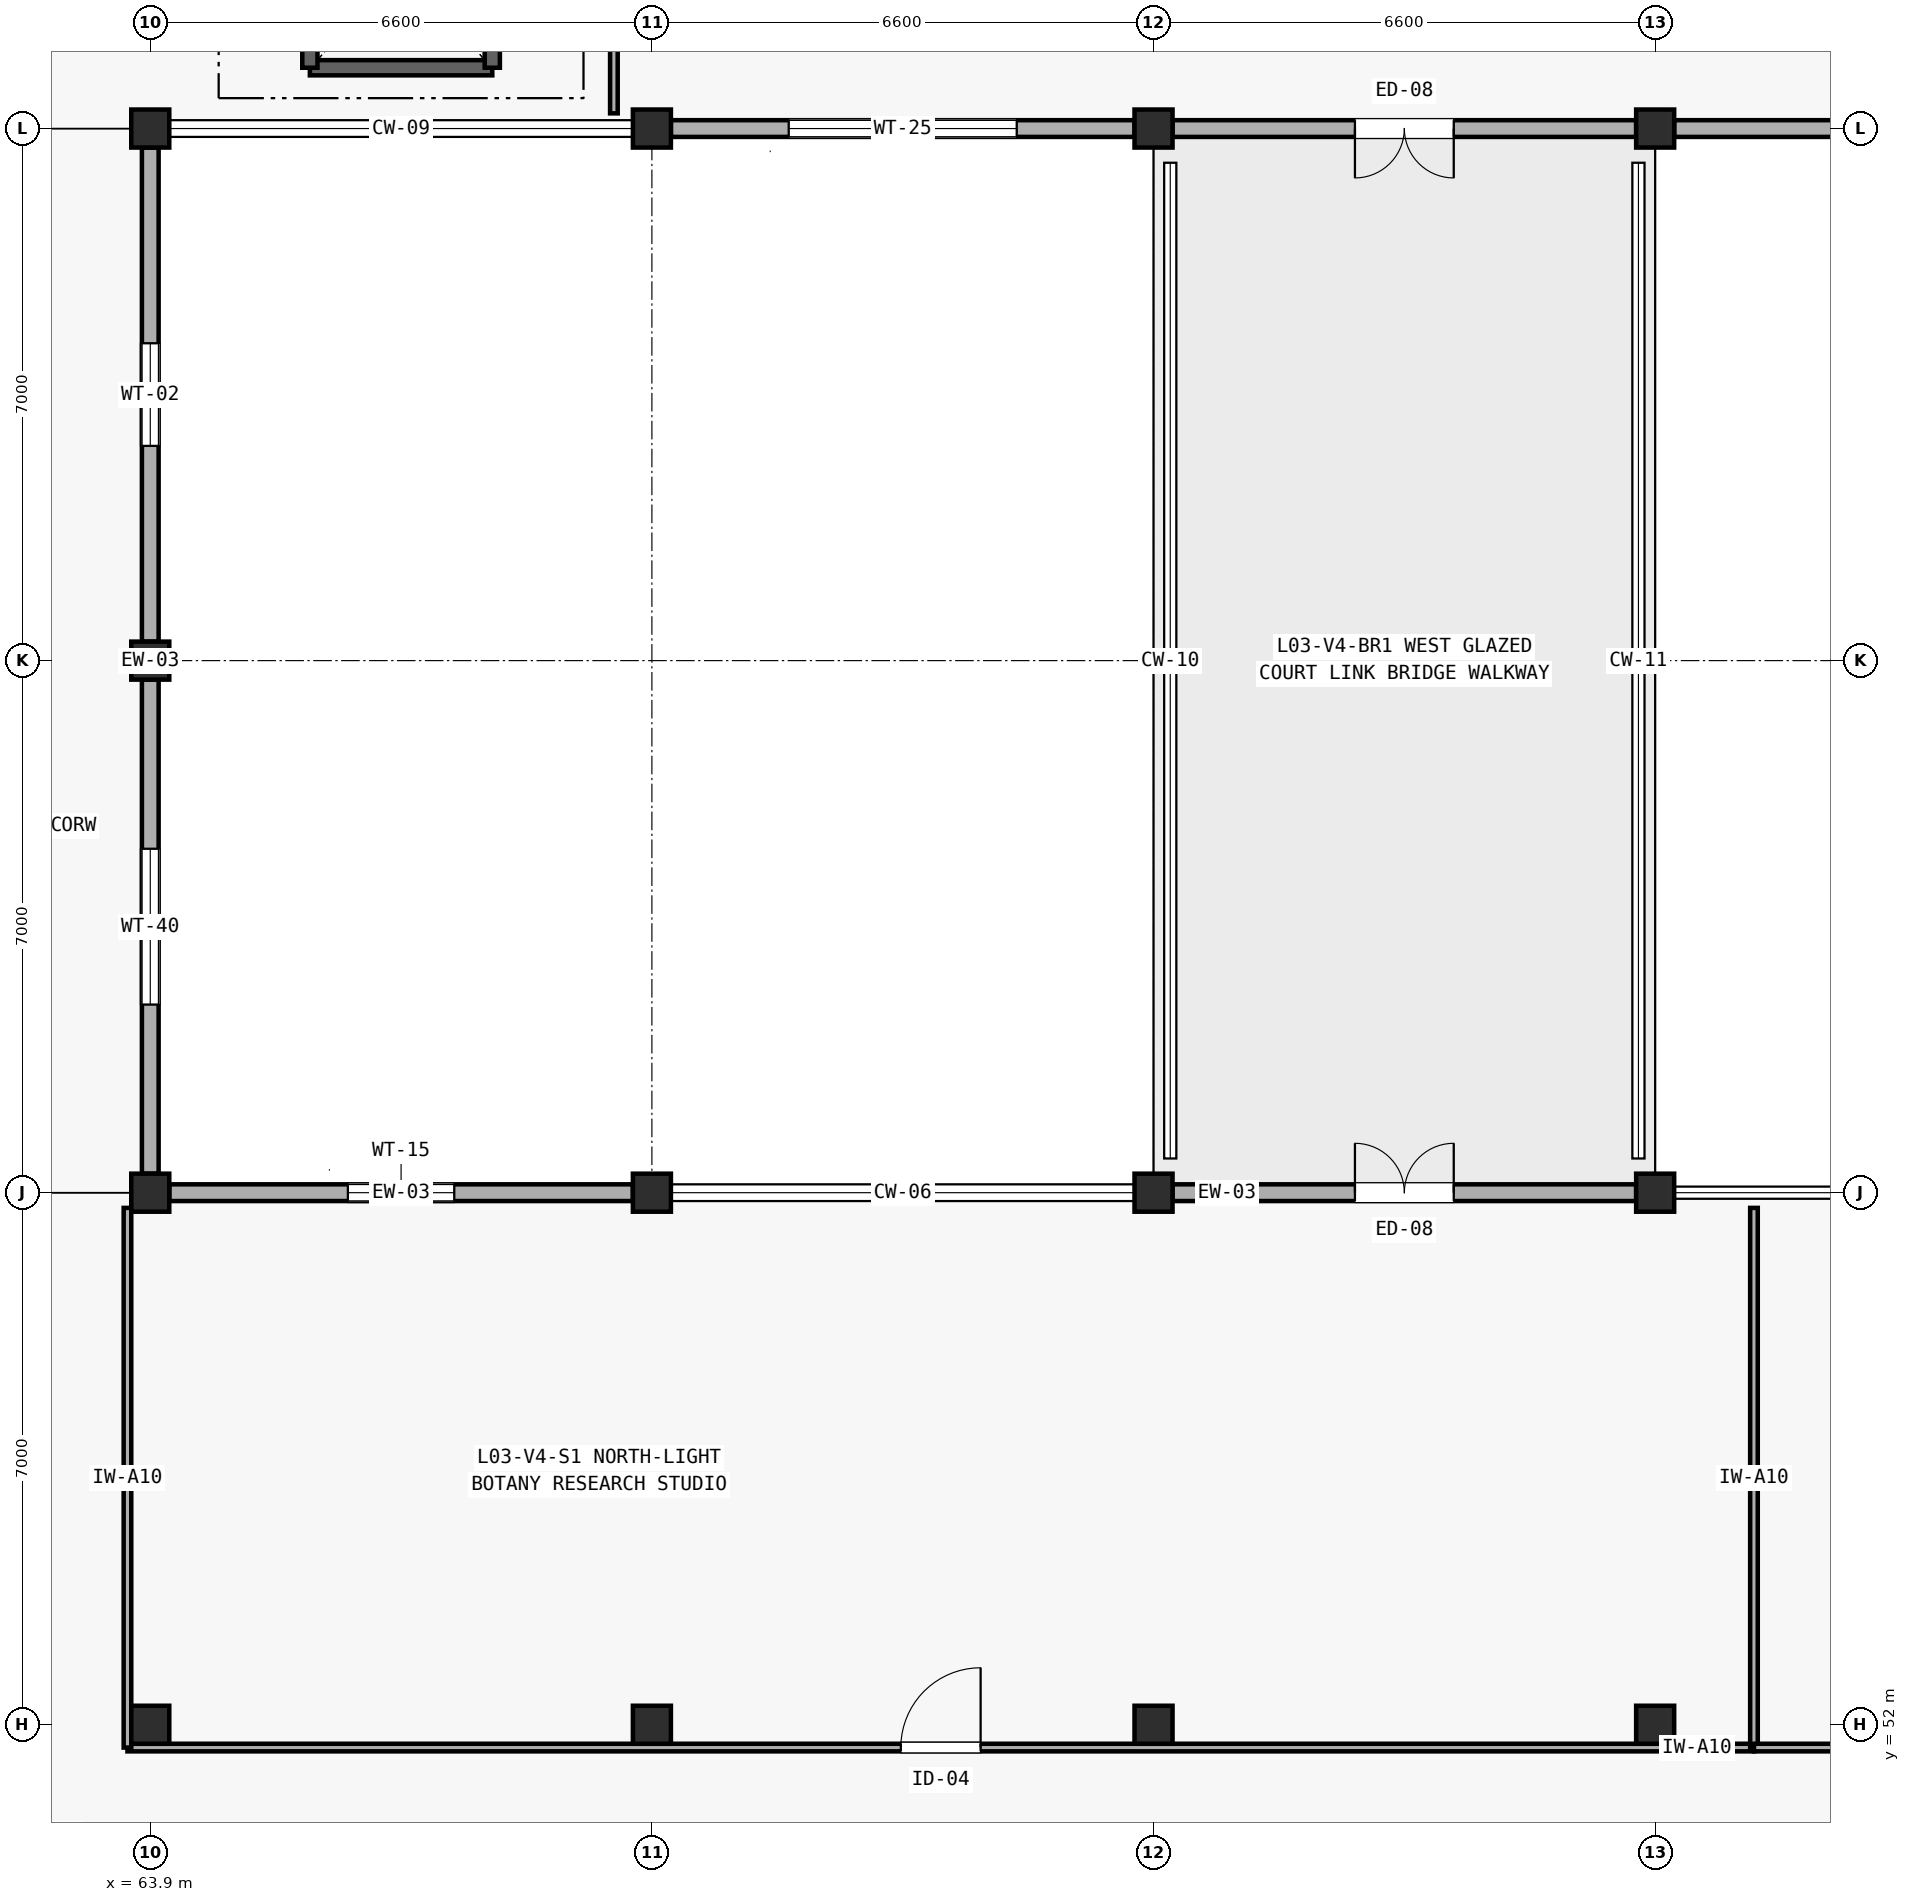
"""IFC4 building model, lengths in metres.
Left out: names, types, materials, properties, quantities, classifications, styles, units other than length and angle.
Written with IfcOpenShell. Run it as: python <this file> out.ifc"""

import sys

from ifc_helpers import new_model, si_unit, direction, frame, frame_2d, origin, origin_2d, place, context, subcontext, project, spatial, rectangle, extrude, element, fill, save


model = new_model("IFC4")
c1 = context("Model", 3, precision=1e-05, world=origin(), true_north=direction((0.0, 1.0)))
c2 = subcontext(c1, "Body", "Model", "MODEL_VIEW")
j1 = project(units=[si_unit("LENGTHUNIT", "METRE"), si_unit("PLANEANGLEUNIT", "RADIAN")], contexts=[c1])
p1 = place(None, origin())
s1 = spatial("IfcSite", under=j1, at=p1, CompositionType="ELEMENT")
p2 = place(p1, origin())
s2 = spatial("IfcBuilding", under=s1, at=p2, CompositionType="ELEMENT")
p3 = place(p2, frame((0.0, 0.0, 12.6)))
s3 = spatial("IfcBuildingStorey", under=s2, at=p3, CompositionType="ELEMENT", Elevation=12.6)
for number, where, z_axis, x_axis in (
    (1, (63.9, 52.0, 0.0), (0.0, 0.0, 1.0), (1.0, 0.0, 0.0)),
    (2, (63.9, 59.0, 0.0), (0.0, 0.0, 1.0), (1.0, 0.0, 0.0)),
    (3, (63.9, 66.0, 0.0), (0.0, 0.0, 1.0), (1.0, 0.0, 0.0)),
    (4, (63.9, 73.0, 0.0), (0.0, 0.0, 1.0), (1.0, 0.0, 0.0)),
    (5, (70.5, 52.0, 0.0), (0.0, 0.0, 1.0), (1.0, 0.0, 0.0)),
    (6, (70.5, 59.0, 0.0), (0.0, 0.0, 1.0), (1.0, 0.0, 0.0)),
    (7, (70.5, 73.0, 0.0), (0.0, 0.0, 1.0), (1.0, 0.0, 0.0)),
    (8, (77.1, 52.0, 0.0), (0.0, 0.0, 1.0), (1.0, 0.0, 0.0)),
    (9, (77.1, 59.0, 0.0), (0.0, 0.0, 1.0), (1.0, 0.0, 0.0)),
    (10, (77.1, 73.0, 0.0), (0.0, 0.0, 1.0), (1.0, 0.0, 0.0)),
    (11, (83.7, 52.0, 0.0), (0.0, 0.0, 1.0), (1.0, 0.0, 0.0)),
    (12, (83.7, 59.0, 0.0), (0.0, 0.0, 1.0), (1.0, 0.0, 0.0)),
    (13, (83.7, 73.0, 0.0), (0.0, 0.0, 1.0), (1.0, 0.0, 0.0)),
):
    element("IfcColumn", number, at=place(p3, frame(where, z_axis=z_axis, x_axis=x_axis)), inside=s3, PredefinedType="COLUMN", context=c2, shape_type="SweptSolid", body=[
        extrude(rectangle(XDim=0.5, YDim=0.5, at=origin_2d()), origin(), (0.0, 0.0, 1.0), 4.2),
    ])
p4 = place(p3, frame((64.15, 59.0, 0.0), z_axis=(0.0, 0.0, 1.0), x_axis=(1.0, 0.0, 0.0)))
e14 = element("IfcWall", 14, at=p4, inside=s3, PredefinedType="SOLIDWALL", context=c2, shape_type="SweptSolid", body=[
    extrude(rectangle(XDim=6.1, YDim=0.22, at=frame_2d((3.05, 0.0))), origin(), (0.0, 0.0, 1.0), 3.405),
])
p5 = place(p4, frame((2.35, 0.0, 0.85)))
e15 = element("IfcOpeningElement", 15, at=p5, cuts=e14, PredefinedType="OPENING", context=c2, shape_type="SweptSolid", body=[
    extrude(rectangle(XDim=1.4, YDim=1.25, at=frame_2d((0.7, 0.625))), frame((0.0, 0.12, 0.0), z_axis=(0.0, -1.0, 0.0), x_axis=(1.0, 0.0, 0.0)), (0.0, 0.0, 1.0), 0.24),
])
p6 = place(p3, frame((77.35, 59.0, 0.0), z_axis=(0.0, 0.0, 1.0), x_axis=(1.0, 0.0, 0.0)))
e16 = element("IfcWall", 16, at=p6, inside=s3, PredefinedType="SOLIDWALL", context=c2, shape_type="SweptSolid", body=[
    extrude(rectangle(XDim=6.1, YDim=0.22, at=frame_2d((3.05, 0.0))), origin(), (0.0, 0.0, 1.0), 3.405),
])
p7 = place(p6, frame((2.4, 0.0, 0.0)))
e17 = element("IfcOpeningElement", 17, at=p7, cuts=e16, PredefinedType="OPENING", context=c2, shape_type="SweptSolid", body=[
    extrude(rectangle(XDim=1.3, YDim=2.15, at=frame_2d((0.65, 1.075))), frame((0.0, 0.12, 0.0), z_axis=(0.0, -1.0, 0.0), x_axis=(1.0, 0.0, 0.0)), (0.0, 0.0, 1.0), 0.24),
])
p8 = place(p3, frame((70.75, 73.0, 0.0), z_axis=(0.0, 0.0, 1.0), x_axis=(1.0, 0.0, 0.0)))
e18 = element("IfcWall", 18, at=p8, inside=s3, PredefinedType="SOLIDWALL", context=c2, shape_type="SweptSolid", body=[
    extrude(rectangle(XDim=6.1, YDim=0.22, at=frame_2d((3.05, 0.0))), origin(), (0.0, 0.0, 1.0), 3.405),
])
p9 = place(p8, frame((1.55, 0.0, 0.85)))
e19 = element("IfcOpeningElement", 19, at=p9, cuts=e18, PredefinedType="OPENING", context=c2, shape_type="SweptSolid", body=[
    extrude(rectangle(XDim=3.0, YDim=1.6, at=frame_2d((1.5, 0.8))), frame((0.0, 0.12, 0.0), z_axis=(0.0, -1.0, 0.0), x_axis=(1.0, 0.0, 0.0)), (0.0, 0.0, 1.0), 0.24),
])
p10 = place(p3, frame((77.35, 73.0, 0.0), z_axis=(0.0, 0.0, 1.0), x_axis=(1.0, 0.0, 0.0)))
e20 = element("IfcWall", 20, at=p10, inside=s3, PredefinedType="SOLIDWALL", context=c2, shape_type="SweptSolid", body=[
    extrude(rectangle(XDim=6.1, YDim=0.22, at=frame_2d((3.05, 0.0))), origin(), (0.0, 0.0, 1.0), 3.405),
])
p11 = place(p10, frame((2.4, 0.0, 0.0)))
e21 = element("IfcOpeningElement", 21, at=p11, cuts=e20, PredefinedType="OPENING", context=c2, shape_type="SweptSolid", body=[
    extrude(rectangle(XDim=1.3, YDim=2.15, at=frame_2d((0.65, 1.075))), frame((0.0, 0.12, 0.0), z_axis=(0.0, -1.0, 0.0), x_axis=(1.0, 0.0, 0.0)), (0.0, 0.0, 1.0), 0.24),
])
p12 = place(p3, frame((83.95, 73.0, 0.0), z_axis=(0.0, 0.0, 1.0), x_axis=(1.0, 0.0, 0.0)))
e22 = element("IfcWall", 22, at=p12, inside=s3, PredefinedType="SOLIDWALL", context=c2, shape_type="SweptSolid", body=[
    extrude(rectangle(XDim=6.1, YDim=0.22, at=frame_2d((3.05, 0.0))), origin(), (0.0, 0.0, 1.0), 3.405),
])
p13 = place(p12, frame((2.4, 0.0, 0.85)))
e23 = element("IfcOpeningElement", 23, at=p13, cuts=e22, PredefinedType="OPENING", context=c2, shape_type="SweptSolid", body=[
    extrude(rectangle(XDim=1.3, YDim=1.45, at=frame_2d((0.65, 0.725))), frame((0.0, 0.12, 0.0), z_axis=(0.0, -1.0, 0.0), x_axis=(1.0, 0.0, 0.0)), (0.0, 0.0, 1.0), 0.24),
])
p14 = place(p3, frame((63.9, 59.25, 0.0), z_axis=(0.0, 0.0, 1.0), x_axis=(0.0, 1.0, 0.0)))
e24 = element("IfcWall", 24, at=p14, inside=s3, PredefinedType="SOLIDWALL", context=c2, shape_type="SweptSolid", body=[
    extrude(rectangle(XDim=6.5, YDim=0.22, at=frame_2d((3.25, 0.0))), origin(), (0.0, 0.0, 1.0), 3.325),
])
p15 = place(p14, frame((2.225, 0.0, 0.85)))
e25 = element("IfcOpeningElement", 25, at=p15, cuts=e24, PredefinedType="OPENING", context=c2, shape_type="SweptSolid", body=[
    extrude(rectangle(XDim=2.05, YDim=1.55, at=frame_2d((1.025, 0.775))), frame((0.0, 0.12, 0.0), z_axis=(0.0, -1.0, 0.0), x_axis=(1.0, 0.0, 0.0)), (0.0, 0.0, 1.0), 0.24),
])
p16 = place(p3, frame((63.9, 66.25, 0.0), z_axis=(0.0, 0.0, 1.0), x_axis=(0.0, 1.0, 0.0)))
e26 = element("IfcWall", 26, at=p16, inside=s3, PredefinedType="SOLIDWALL", context=c2, shape_type="SweptSolid", body=[
    extrude(rectangle(XDim=6.5, YDim=0.22, at=frame_2d((3.25, 0.0))), origin(), (0.0, 0.0, 1.0), 3.85),
])
p17 = place(p16, frame((2.575, 0.0, 0.85)))
e27 = element("IfcOpeningElement", 27, at=p17, cuts=e26, PredefinedType="OPENING", context=c2, shape_type="SweptSolid", body=[
    extrude(rectangle(XDim=1.35, YDim=1.35, at=frame_2d((0.675, 0.675))), frame((0.0, 0.12, 0.0), z_axis=(0.0, -1.0, 0.0), x_axis=(1.0, 0.0, 0.0)), (0.0, 0.0, 1.0), 0.24),
])
p18 = place(p3, frame((66.0, 73.8, 0.0), z_axis=(0.0, 0.0, 1.0), x_axis=(1.0, 0.0, 0.0)))
e28 = element("IfcWall", 28, at=p18, inside=s3, PredefinedType="SHEAR", context=c2, shape_type="SweptSolid", body=[
    extrude(rectangle(XDim=2.4, YDim=0.2, at=frame_2d((1.2, 0.0))), origin(), (0.0, 0.0, 1.0), 4.2),
])
for number, where, z_axis, x_axis in (
    (29, (66.0, 73.8, 0.0), (0.0, 0.0, 1.0), (0.0, 1.0, 0.0)),
    (30, (68.4, 73.8, 0.0), (0.0, 0.0, 1.0), (0.0, 1.0, 0.0)),
):
    element("IfcWall", number, at=place(p3, frame(where, z_axis=z_axis, x_axis=x_axis)), inside=s3, PredefinedType="SHEAR", context=c2, shape_type="SweptSolid", body=[
        extrude(rectangle(XDim=2.8, YDim=0.2, at=frame_2d((1.4, 0.0))), origin(), (0.0, 0.0, 1.0), 4.2),
    ])
p19 = place(p3, frame((63.6, 51.7, 0.0), z_axis=(0.0, 0.0, 1.0), x_axis=(1.0, 0.0, 0.0)))
e31 = element("IfcWall", 31, at=p19, inside=s3, PredefinedType="PARTITIONING", context=c2, shape_type="SweptSolid", body=[
    extrude(rectangle(XDim=21.4, YDim=0.1, at=frame_2d((10.7, 0.0))), origin(), (0.0, 0.0, 1.0), 3.405),
])
p20 = place(p19, frame((10.175, 0.0, 0.0)))
e32 = element("IfcOpeningElement", 32, at=p20, cuts=e31, PredefinedType="OPENING", context=c2, shape_type="SweptSolid", body=[
    extrude(rectangle(XDim=1.05, YDim=2.15, at=frame_2d((0.525, 1.075))), frame((0.0, 0.06, 0.0), z_axis=(0.0, -1.0, 0.0), x_axis=(1.0, 0.0, 0.0)), (0.0, 0.0, 1.0), 0.12),
])
for number, where, z_axis, x_axis in (
    (33, (63.6, 51.7, 0.0), (0.0, 0.0, 1.0), (0.0, 1.0, 0.0)),
    (34, (85.0, 51.7, 0.0), (0.0, 0.0, 1.0), (0.0, 1.0, 0.0)),
):
    element("IfcWall", number, at=place(p3, frame(where, z_axis=z_axis, x_axis=x_axis)), inside=s3, PredefinedType="PARTITIONING", context=c2, shape_type="SweptSolid", body=[
        extrude(rectangle(XDim=7.1, YDim=0.1, at=frame_2d((3.55, 0.0))), origin(), (0.0, 0.0, 1.0), 3.9),
    ])
p21 = place(p3, frame((85.0, 51.7, 0.0), z_axis=(0.0, 0.0, 1.0), x_axis=(1.0, 0.0, 0.0)))
e35 = element("IfcWall", 35, at=p21, inside=s3, PredefinedType="PARTITIONING", context=c2, shape_type="SweptSolid", body=[
    extrude(rectangle(XDim=18.5, YDim=0.1, at=frame_2d((9.25, 0.0))), origin(), (0.0, 0.0, 1.0), 3.405),
])
p22 = place(p21, frame((8.675, 0.0, 0.0)))
e36 = element("IfcOpeningElement", 36, at=p22, cuts=e35, PredefinedType="OPENING", context=c2, shape_type="SweptSolid", body=[
    extrude(rectangle(XDim=1.15, YDim=2.15, at=frame_2d((0.575, 1.075))), frame((0.0, 0.06, 0.0), z_axis=(0.0, -1.0, 0.0), x_axis=(1.0, 0.0, 0.0)), (0.0, 0.0, 1.0), 0.12),
])
p23 = place(p3, frame((70.0, 73.2, 0.0), z_axis=(0.0, 0.0, 1.0), x_axis=(0.0, 1.0, 0.0)))
e37 = element("IfcWall", 37, at=p23, inside=s3, PredefinedType="PARTITIONING", context=c2, shape_type="SweptSolid", body=[
    extrude(rectangle(XDim=4.1, YDim=0.1, at=frame_2d((2.05, 0.0))), origin(), (0.0, 0.0, 1.0), 3.9),
])
p24 = place(p5, origin())
e38 = element("IfcWindow", 38, at=p24, inside=s3, PartitioningType="SINGLE_PANEL", PredefinedType="WINDOW", context=c2, shape_type="SweptSolid", body=[
    extrude(rectangle(XDim=1.4, YDim=1.25, at=frame_2d((0.7, 0.625))), frame((0.0, 0.03, 0.0), z_axis=(0.0, -1.0, 0.0), x_axis=(1.0, 0.0, 0.0)), (0.0, 0.0, 1.0), 0.06),
])
fill(e15, e38)
p25 = place(p7, origin())
e39 = element("IfcDoor", 39, at=p25, inside=s3, OperationType="DOUBLE_DOOR_SINGLE_SWING", PredefinedType="DOOR", context=c2, shape_type="SweptSolid", body=[
    extrude(rectangle(XDim=1.3, YDim=2.15, at=frame_2d((0.65, 1.075))), frame((0.0, 0.025, 0.0), z_axis=(0.0, -1.0, 0.0), x_axis=(1.0, 0.0, 0.0)), (0.0, 0.0, 1.0), 0.05),
])
fill(e17, e39)
p26 = place(p9, origin())
e40 = element("IfcWindow", 40, at=p26, inside=s3, PartitioningType="SINGLE_PANEL", PredefinedType="WINDOW", context=c2, shape_type="SweptSolid", body=[
    extrude(rectangle(XDim=3.0, YDim=1.6, at=frame_2d((1.5, 0.8))), frame((0.0, 0.03, 0.0), z_axis=(0.0, -1.0, 0.0), x_axis=(1.0, 0.0, 0.0)), (0.0, 0.0, 1.0), 0.06),
])
fill(e19, e40)
p27 = place(p11, frame((1.3, 0.0, 0.0), z_axis=(0.0, 0.0, 1.0), x_axis=(-1.0, 0.0, 0.0)))
e41 = element("IfcDoor", 41, at=p27, inside=s3, OperationType="DOUBLE_DOOR_SINGLE_SWING", PredefinedType="DOOR", context=c2, shape_type="SweptSolid", body=[
    extrude(rectangle(XDim=1.3, YDim=2.15, at=frame_2d((0.65, 1.075))), frame((0.0, 0.025, 0.0), z_axis=(0.0, -1.0, 0.0), x_axis=(1.0, 0.0, 0.0)), (0.0, 0.0, 1.0), 0.05),
])
fill(e21, e41)
p28 = place(p15, origin())
e42 = element("IfcWindow", 42, at=p28, inside=s3, PartitioningType="SINGLE_PANEL", PredefinedType="WINDOW", context=c2, shape_type="SweptSolid", body=[
    extrude(rectangle(XDim=2.05, YDim=1.55, at=frame_2d((1.025, 0.775))), frame((0.0, 0.03, 0.0), z_axis=(0.0, -1.0, 0.0), x_axis=(1.0, 0.0, 0.0)), (0.0, 0.0, 1.0), 0.06),
])
fill(e25, e42)
p29 = place(p17, origin())
e43 = element("IfcWindow", 43, at=p29, inside=s3, PartitioningType="SINGLE_PANEL", PredefinedType="WINDOW", context=c2, shape_type="SweptSolid", body=[
    extrude(rectangle(XDim=1.35, YDim=1.35, at=frame_2d((0.675, 0.675))), frame((0.0, 0.03, 0.0), z_axis=(0.0, -1.0, 0.0), x_axis=(1.0, 0.0, 0.0)), (0.0, 0.0, 1.0), 0.06),
])
fill(e27, e43)
p30 = place(p20, origin())
e44 = element("IfcDoor", 44, at=p30, inside=s3, OperationType="SINGLE_SWING_RIGHT", PredefinedType="DOOR", context=c2, shape_type="SweptSolid", body=[
    extrude(rectangle(XDim=1.05, YDim=2.15, at=frame_2d((0.525, 1.075))), frame((0.0, 0.025, 0.0), z_axis=(0.0, -1.0, 0.0), x_axis=(1.0, 0.0, 0.0)), (0.0, 0.0, 1.0), 0.05),
])
fill(e32, e44)
save(model, sys.argv[1])
